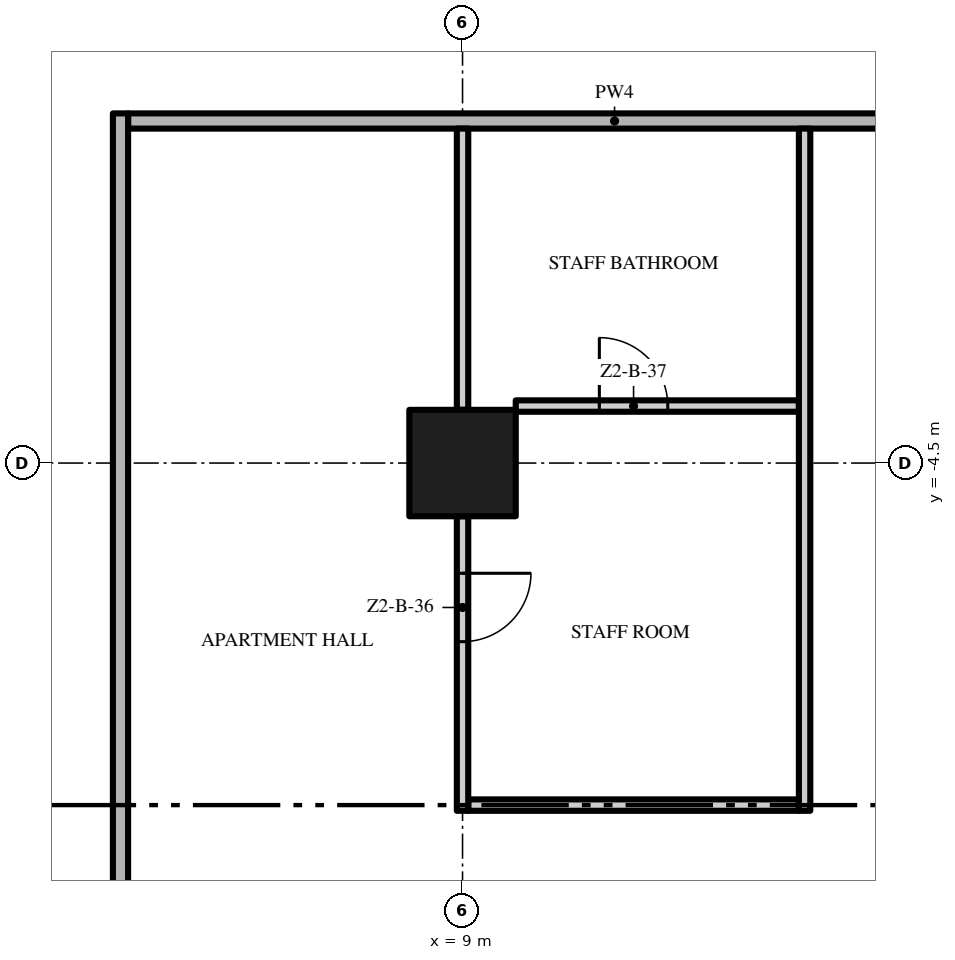
"""IFC4 building model, lengths in metres.
Left out: names, types, materials, properties, quantities, classifications, styles, units other than length and angle.
Written with IfcOpenShell. Run it as: python <this file> out.ifc"""

import sys

from ifc_helpers import new_model, si_unit, direction, frame, frame_2d, origin, origin_2d, place, context, subcontext, project, spatial, rectangle, extrude, element, fill, save


model = new_model("IFC4")
c1 = context("Model", 3, precision=1e-05, world=origin(), true_north=direction((0.0, 1.0)))
c2 = subcontext(c1, "Body", "Model", "MODEL_VIEW")
j1 = project(units=[si_unit("LENGTHUNIT", "METRE"), si_unit("PLANEANGLEUNIT", "RADIAN")], contexts=[c1])
p1 = place(None, origin())
s1 = spatial("IfcSite", under=j1, at=p1, CompositionType="ELEMENT")
p2 = place(p1, origin())
s2 = spatial("IfcBuilding", under=s1, at=p2, CompositionType="ELEMENT")
p3 = place(p2, frame((0.0, 0.0, 88.4)))
s3 = spatial("IfcBuildingStorey", under=s2, at=p3, CompositionType="ELEMENT", Elevation=88.4)
p4 = place(p3, frame((9.0, -4.5, 0.0), z_axis=(0.0, 0.0, 1.0), x_axis=(1.0, 0.0, 0.0)))
e1 = element("IfcColumn", 1, at=p4, inside=s3, PredefinedType="COLUMN", context=c2, shape_type="SweptSolid", body=[
    extrude(rectangle(XDim=1.4, YDim=1.4, at=origin_2d()), origin(), (0.0, 0.0, 1.0), 3.5),
])
p5 = place(p3, frame((9.075, -9.0, 0.0), z_axis=(0.0, 0.0, 1.0), x_axis=(1.0, 0.0, 0.0)))
e2 = element("IfcWall", 2, at=p5, inside=s3, PredefinedType="PARTITIONING", context=c2, shape_type="SweptSolid", body=[
    extrude(rectangle(XDim=4.35, YDim=0.15, at=frame_2d((2.175, 0.0))), origin(), (0.0, 0.0, 1.0), 3.5),
])
p6 = place(p3, frame((9.7, -3.75, 0.0), z_axis=(0.0, 0.0, 1.0), x_axis=(1.0, 0.0, 0.0)))
e3 = element("IfcWall", 3, at=p6, inside=s3, PredefinedType="PARTITIONING", context=c2, shape_type="SweptSolid", body=[
    extrude(rectangle(XDim=3.725, YDim=0.15, at=frame_2d((1.863, 0.0))), origin(), (0.0, 0.0, 1.0), 3.5),
])
p7 = place(p6, frame((1.1, 0.0, 0.0)))
e4 = element("IfcOpeningElement", 4, at=p7, cuts=e3, PredefinedType="OPENING", context=c2, shape_type="SweptSolid", body=[
    extrude(rectangle(XDim=0.9, YDim=2.1, at=frame_2d((0.45, 1.05))), frame((0.0, 0.085, 0.0), z_axis=(0.0, -1.0, 0.0), x_axis=(1.0, 0.0, 0.0)), (0.0, 0.0, 1.0), 0.17),
])
p8 = place(p3, frame((4.6, 0.0, 0.0), z_axis=(0.0, 0.0, 1.0), x_axis=(1.0, 0.0, 0.0)))
e5 = element("IfcWall", 5, at=p8, inside=s3, PredefinedType="PARTITIONING", context=c2, shape_type="SweptSolid", body=[
    extrude(rectangle(XDim=12.8, YDim=0.2, at=frame_2d((6.4, 0.0))), origin(), (0.0, 0.0, 1.0), 3.5),
])
p9 = place(p3, frame((4.5, 0.1, 0.0), z_axis=(0.0, 0.0, 1.0), x_axis=(0.0, -1.0, 0.0)))
e6 = element("IfcWall", 6, at=p9, inside=s3, PredefinedType="PARTITIONING", context=c2, shape_type="SweptSolid", body=[
    extrude(rectangle(XDim=22.3, YDim=0.2, at=frame_2d((11.15, 0.0))), origin(), (0.0, 0.0, 1.0), 3.5),
])
p10 = place(p9, frame((10.6, 0.0, 0.0)))
e7 = element("IfcOpeningElement", 7, at=p10, cuts=e6, PredefinedType="OPENING", context=c2, shape_type="SweptSolid", body=[
    extrude(rectangle(XDim=1.5, YDim=2.4, at=frame_2d((0.75, 1.2))), frame((0.0, 0.11, 0.0), z_axis=(0.0, -1.0, 0.0), x_axis=(1.0, 0.0, 0.0)), (0.0, 0.0, 1.0), 0.22),
])
p11 = place(p3, frame((9.0, -5.2, 0.0), z_axis=(0.0, 0.0, 1.0), x_axis=(0.0, -1.0, 0.0)))
e8 = element("IfcWall", 8, at=p11, inside=s3, PredefinedType="PARTITIONING", context=c2, shape_type="SweptSolid", body=[
    extrude(rectangle(XDim=3.875, YDim=0.15, at=frame_2d((1.938, 0.0))), origin(), (0.0, 0.0, 1.0), 3.5),
])
p12 = place(p11, frame((0.75, 0.0, 0.0)))
e9 = element("IfcOpeningElement", 9, at=p12, cuts=e8, PredefinedType="OPENING", context=c2, shape_type="SweptSolid", body=[
    extrude(rectangle(XDim=0.9, YDim=2.1, at=frame_2d((0.45, 1.05))), frame((0.0, 0.085, 0.0), z_axis=(0.0, -1.0, 0.0), x_axis=(1.0, 0.0, 0.0)), (0.0, 0.0, 1.0), 0.17),
])
p13 = place(p3, frame((9.0, -3.8, 0.0), z_axis=(0.0, 0.0, 1.0), x_axis=(0.0, 1.0, 0.0)))
e10 = element("IfcWall", 10, at=p13, inside=s3, PredefinedType="PARTITIONING", context=c2, shape_type="SweptSolid", body=[
    extrude(rectangle(XDim=3.7, YDim=0.15, at=frame_2d((1.85, 0.0))), origin(), (0.0, 0.0, 1.0), 3.5),
])
p14 = place(p3, frame((13.5, -9.075, 0.0), z_axis=(0.0, 0.0, 1.0), x_axis=(0.0, 1.0, 0.0)))
e11 = element("IfcWall", 11, at=p14, inside=s3, PredefinedType="PARTITIONING", context=c2, shape_type="SweptSolid", body=[
    extrude(rectangle(XDim=8.975, YDim=0.15, at=frame_2d((4.487, 0.0))), origin(), (0.0, 0.0, 1.0), 3.5),
])
p15 = place(p12, origin())
e12 = element("IfcDoor", 12, at=p15, inside=s3, OperationType="SINGLE_SWING_LEFT", PredefinedType="DOOR", context=c2, shape_type="SweptSolid", body=[
    extrude(rectangle(XDim=0.9, YDim=2.1, at=frame_2d((0.45, 1.05))), frame((0.0, 0.025, 0.0), z_axis=(0.0, -1.0, 0.0), x_axis=(1.0, 0.0, 0.0)), (0.0, 0.0, 1.0), 0.05),
])
fill(e9, e12)
p16 = place(p7, origin())
e13 = element("IfcDoor", 13, at=p16, inside=s3, OperationType="SINGLE_SWING_LEFT", PredefinedType="DOOR", context=c2, shape_type="SweptSolid", body=[
    extrude(rectangle(XDim=0.9, YDim=2.1, at=frame_2d((0.45, 1.05))), frame((0.0, 0.025, 0.0), z_axis=(0.0, -1.0, 0.0), x_axis=(1.0, 0.0, 0.0)), (0.0, 0.0, 1.0), 0.05),
])
fill(e4, e13)
save(model, sys.argv[1])
